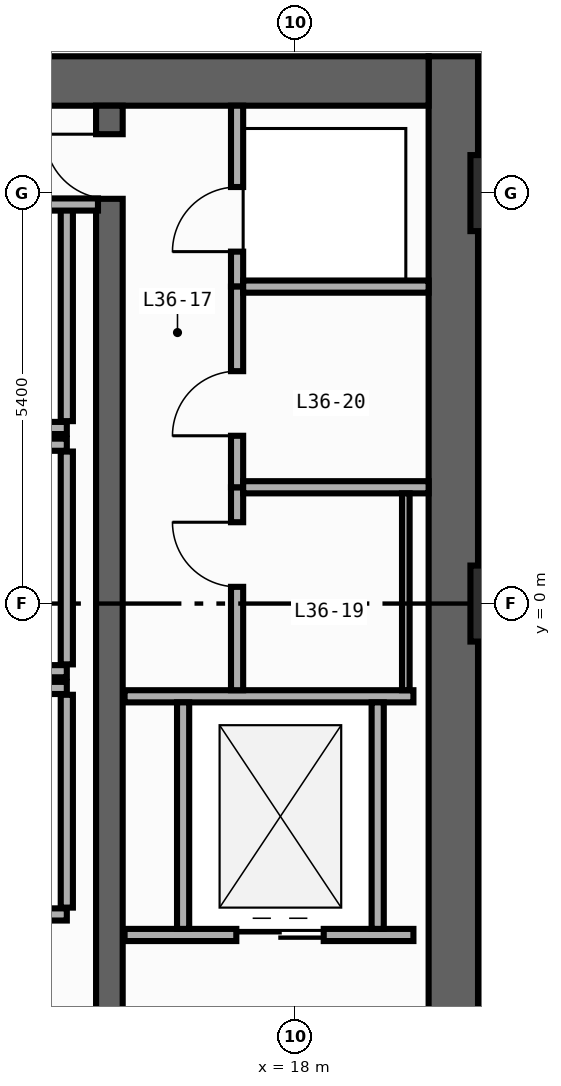
"""IFC4 building model, lengths in metres.
Left out: names, types, materials, properties, quantities, classifications, styles, units other than length and angle.
Written with IfcOpenShell. Run it as: python <this file> out.ifc"""

import sys

from ifc_helpers import new_model, si_unit, direction, frame, frame_2d, origin, origin_2d, place, context, subcontext, project, spatial, rectangle, extrude, element, fill, save


model = new_model("IFC4")
c1 = context("Model", 3, precision=1e-05, world=origin(), true_north=direction((0.0, 1.0)))
c2 = subcontext(c1, "Body", "Model", "MODEL_VIEW")
j1 = project(units=[si_unit("LENGTHUNIT", "METRE"), si_unit("PLANEANGLEUNIT", "RADIAN")], contexts=[c1])
p1 = place(None, origin())
s1 = spatial("IfcSite", under=j1, at=p1, CompositionType="ELEMENT")
p2 = place(p1, origin())
s2 = spatial("IfcBuilding", under=s1, at=p2, CompositionType="ELEMENT")
p3 = place(p2, frame((0.0, 0.0, 160.4)))
s3 = spatial("IfcBuildingStorey", under=s2, at=p3, CompositionType="ELEMENT", Elevation=160.4)
p4 = place(p3, frame((20.075, -19.8, 0.0), z_axis=(0.0, 0.0, 1.0), x_axis=(0.0, 1.0, 0.0)))
e1 = element("IfcWall", 1, at=p4, inside=s3, PredefinedType="SHEAR", context=c2, shape_type="SweptSolid", body=[
    extrude(rectangle(XDim=27.0, YDim=0.65, at=frame_2d((13.5, 0.0))), origin(), (0.0, 0.0, 1.0), 4.34),
])
p5 = place(p3, frame((12.65, 6.875, 0.0), z_axis=(0.0, 0.0, 1.0), x_axis=(1.0, 0.0, 0.0)))
e2 = element("IfcWall", 2, at=p5, inside=s3, PredefinedType="SHEAR", context=c2, shape_type="SweptSolid", body=[
    extrude(rectangle(XDim=7.1, YDim=0.65, at=frame_2d((3.55, 0.0))), origin(), (0.0, 0.0, 1.0), 4.34),
])
p6 = place(p3, frame((15.55, -19.15, 0.0), z_axis=(0.0, 0.0, 1.0), x_axis=(0.0, 1.0, 0.0)))
e3 = element("IfcWall", 3, at=p6, inside=s3, PredefinedType="SHEAR", context=c2, shape_type="SweptSolid", body=[
    extrude(rectangle(XDim=25.7, YDim=0.35, at=frame_2d((12.85, 0.0))), origin(), (0.0, 0.0, 1.0), 4.34),
])
p7 = place(p6, frame((12.075, 0.0, 0.0)))
e4 = element("IfcOpeningElement", 4, at=p7, cuts=e3, PredefinedType="OPENING", context=c2, shape_type="SweptSolid", body=[
    extrude(rectangle(XDim=1.15, YDim=2.2, at=frame_2d((0.575, 1.1))), frame((0.0, 0.185, 0.0), z_axis=(0.0, -1.0, 0.0), x_axis=(1.0, 0.0, 0.0)), (0.0, 0.0, 1.0), 0.37),
])
p8 = place(p6, frame((24.475, 0.0, 0.0)))
e5 = element("IfcOpeningElement", 5, at=p8, cuts=e3, PredefinedType="OPENING", context=c2, shape_type="SweptSolid", body=[
    extrude(rectangle(XDim=0.85, YDim=2.1, at=frame_2d((0.425, 1.05))), frame((0.0, 0.185, 0.0), z_axis=(0.0, -1.0, 0.0), x_axis=(1.0, 0.0, 0.0)), (0.0, 0.0, 1.0), 0.37),
])
for number, where, z_axis, x_axis in (
    (6, (20.8, 0.0, 0.0), (0.0, 0.0, 1.0), (1.0, 0.0, 0.0)),
    (7, (20.8, 5.4, 0.0), (0.0, 0.0, 1.0), (1.0, 0.0, 0.0)),
):
    element("IfcColumn", number, at=place(p3, frame(where, z_axis=z_axis, x_axis=x_axis)), inside=s3, PredefinedType="COLUMN", context=c2, shape_type="SweptSolid", body=[
        extrude(rectangle(XDim=1.0, YDim=1.0, at=origin_2d()), origin(), (0.0, 0.0, 1.0), 4.6),
    ])
p9 = place(p3, frame((12.65, 2.31, 0.0), z_axis=(0.0, 0.0, 1.0), x_axis=(1.0, 0.0, 0.0)))
e8 = element("IfcWall", 8, at=p9, inside=s3, PredefinedType="STANDARD", context=c2, shape_type="SweptSolid", body=[
    extrude(rectangle(XDim=2.34, YDim=0.16, at=frame_2d((1.17, 0.0))), origin(), (0.0, 0.0, 1.0), 4.34),
])
p10 = place(p3, frame((14.99, 2.4, 0.0), z_axis=(0.0, 0.0, 1.0), x_axis=(0.0, 1.0, 0.0)))
e9 = element("IfcWall", 9, at=p10, inside=s3, PredefinedType="STANDARD", context=c2, shape_type="SweptSolid", body=[
    extrude(rectangle(XDim=2.8, YDim=0.16, at=frame_2d((1.4, 0.0))), origin(), (0.0, 0.0, 1.0), 4.34),
])
for number, where, z_axis, x_axis in (
    (10, (12.65, -0.89, 0.0), (0.0, 0.0, 1.0), (1.0, 0.0, 0.0)),
    (11, (12.65, 2.09, 0.0), (0.0, 0.0, 1.0), (1.0, 0.0, 0.0)),
):
    element("IfcWall", number, at=place(p3, frame(where, z_axis=z_axis, x_axis=x_axis)), inside=s3, PredefinedType="STANDARD", context=c2, shape_type="SweptSolid", body=[
        extrude(rectangle(XDim=2.34, YDim=0.16, at=frame_2d((1.17, 0.0))), origin(), (0.0, 0.0, 1.0), 4.34),
    ])
p11 = place(p3, frame((14.99, -0.8, 0.0), z_axis=(0.0, 0.0, 1.0), x_axis=(0.0, 1.0, 0.0)))
e12 = element("IfcWall", 12, at=p11, inside=s3, PredefinedType="STANDARD", context=c2, shape_type="SweptSolid", body=[
    extrude(rectangle(XDim=2.8, YDim=0.16, at=frame_2d((1.4, 0.0))), origin(), (0.0, 0.0, 1.0), 4.34),
])
for number, where, z_axis, x_axis in (
    (13, (12.65, -4.09, 0.0), (0.0, 0.0, 1.0), (1.0, 0.0, 0.0)),
    (14, (12.65, -1.11, 0.0), (0.0, 0.0, 1.0), (1.0, 0.0, 0.0)),
):
    element("IfcWall", number, at=place(p3, frame(where, z_axis=z_axis, x_axis=x_axis)), inside=s3, PredefinedType="STANDARD", context=c2, shape_type="SweptSolid", body=[
        extrude(rectangle(XDim=2.34, YDim=0.16, at=frame_2d((1.17, 0.0))), origin(), (0.0, 0.0, 1.0), 4.34),
    ])
p12 = place(p3, frame((14.99, -4.0, 0.0), z_axis=(0.0, 0.0, 1.0), x_axis=(0.0, 1.0, 0.0)))
e15 = element("IfcWall", 15, at=p12, inside=s3, PredefinedType="STANDARD", context=c2, shape_type="SweptSolid", body=[
    extrude(rectangle(XDim=2.8, YDim=0.16, at=frame_2d((1.4, 0.0))), origin(), (0.0, 0.0, 1.0), 4.34),
])
p13 = place(p3, frame((15.75, -4.36, 0.0), z_axis=(0.0, 0.0, 1.0), x_axis=(1.0, 0.0, 0.0)))
e16 = element("IfcWall", 16, at=p13, inside=s3, PredefinedType="STANDARD", context=c2, shape_type="SweptSolid", body=[
    extrude(rectangle(XDim=3.8, YDim=0.16, at=frame_2d((1.9, 0.0))), origin(), (0.0, 0.0, 1.0), 4.34),
])
p14 = place(p13, frame((1.47, 0.0, 0.0)))
e17 = element("IfcOpeningElement", 17, at=p14, cuts=e16, PredefinedType="OPENING", context=c2, shape_type="SweptSolid", body=[
    extrude(rectangle(XDim=1.15, YDim=2.2, at=frame_2d((0.575, 1.1))), frame((0.0, 0.09, 0.0), z_axis=(0.0, -1.0, 0.0), x_axis=(1.0, 0.0, 0.0)), (0.0, 0.0, 1.0), 0.18),
])
p15 = place(p3, frame((15.75, -1.22, 0.0), z_axis=(0.0, 0.0, 1.0), x_axis=(1.0, 0.0, 0.0)))
e18 = element("IfcWall", 18, at=p15, inside=s3, PredefinedType="STANDARD", context=c2, shape_type="SweptSolid", body=[
    extrude(rectangle(XDim=3.8, YDim=0.16, at=frame_2d((1.9, 0.0))), origin(), (0.0, 0.0, 1.0), 4.34),
])
for number, where, z_axis, x_axis in (
    (19, (16.52, -4.28, 0.0), (0.0, 0.0, 1.0), (0.0, 1.0, 0.0)),
    (20, (19.08, -4.28, 0.0), (0.0, 0.0, 1.0), (0.0, 1.0, 0.0)),
):
    element("IfcWall", number, at=place(p3, frame(where, z_axis=z_axis, x_axis=x_axis)), inside=s3, PredefinedType="STANDARD", context=c2, shape_type="SweptSolid", body=[
        extrude(rectangle(XDim=2.98, YDim=0.16, at=frame_2d((1.49, 0.0))), origin(), (0.0, 0.0, 1.0), 4.34),
    ])
p16 = place(p3, frame((12.8, 5.25, 0.0), z_axis=(0.0, 0.0, 1.0), x_axis=(1.0, 0.0, 0.0)))
e21 = element("IfcWall", 21, at=p16, inside=s3, PredefinedType="STANDARD", context=c2, shape_type="SweptSolid", body=[
    extrude(rectangle(XDim=2.6, YDim=0.16, at=frame_2d((1.3, 0.0))), origin(), (0.0, 0.0, 1.0), 4.34),
])
p17 = place(p3, frame((17.23, 4.17, 0.0), z_axis=(0.0, 0.0, 1.0), x_axis=(0.0, 1.0, 0.0)))
e22 = element("IfcWall", 22, at=p17, inside=s3, PredefinedType="PARTITIONING", context=c2, shape_type="SweptSolid", body=[
    extrude(rectangle(XDim=2.38, YDim=0.16, at=frame_2d((1.19, 0.0))), origin(), (0.0, 0.0, 1.0), 4.34),
])
p18 = place(p17, frame((0.46, 0.0, 0.0)))
e23 = element("IfcOpeningElement", 23, at=p18, cuts=e22, PredefinedType="OPENING", context=c2, shape_type="SweptSolid", body=[
    extrude(rectangle(XDim=0.85, YDim=2.1, at=frame_2d((0.425, 1.05))), frame((0.0, 0.09, 0.0), z_axis=(0.0, -1.0, 0.0), x_axis=(1.0, 0.0, 0.0)), (0.0, 0.0, 1.0), 0.18),
])
p19 = place(p3, frame((17.23, -1.14, 0.0), z_axis=(0.0, 0.0, 1.0), x_axis=(0.0, 1.0, 0.0)))
e24 = element("IfcWall", 24, at=p19, inside=s3, PredefinedType="PARTITIONING", context=c2, shape_type="SweptSolid", body=[
    extrude(rectangle(XDim=2.67, YDim=0.16, at=frame_2d((1.335, 0.0))), origin(), (0.0, 0.0, 1.0), 4.34),
])
p20 = place(p19, frame((1.36, 0.0, 0.0)))
e25 = element("IfcOpeningElement", 25, at=p20, cuts=e24, PredefinedType="OPENING", context=c2, shape_type="SweptSolid", body=[
    extrude(rectangle(XDim=0.85, YDim=2.1, at=frame_2d((0.425, 1.05))), frame((0.0, 0.09, 0.0), z_axis=(0.0, -1.0, 0.0), x_axis=(1.0, 0.0, 0.0)), (0.0, 0.0, 1.0), 0.18),
])
p21 = place(p3, frame((17.23, 1.53, 0.0), z_axis=(0.0, 0.0, 1.0), x_axis=(0.0, 1.0, 0.0)))
e26 = element("IfcWall", 26, at=p21, inside=s3, PredefinedType="PARTITIONING", context=c2, shape_type="SweptSolid", body=[
    extrude(rectangle(XDim=2.64, YDim=0.16, at=frame_2d((1.32, 0.0))), origin(), (0.0, 0.0, 1.0), 4.34),
])
p22 = place(p21, frame((0.677, 0.0, 0.0)))
e27 = element("IfcOpeningElement", 27, at=p22, cuts=e26, PredefinedType="OPENING", context=c2, shape_type="SweptSolid", body=[
    extrude(rectangle(XDim=0.85, YDim=2.1, at=frame_2d((0.425, 1.05))), frame((0.0, 0.09, 0.0), z_axis=(0.0, -1.0, 0.0), x_axis=(1.0, 0.0, 0.0)), (0.0, 0.0, 1.0), 0.18),
])
for number, where, z_axis, x_axis in (
    (28, (17.31, 4.17, 0.0), (0.0, 0.0, 1.0), (1.0, 0.0, 0.0)),
    (29, (17.31, 1.53, 0.0), (0.0, 0.0, 1.0), (1.0, 0.0, 0.0)),
):
    element("IfcWall", number, at=place(p3, frame(where, z_axis=z_axis, x_axis=x_axis)), inside=s3, PredefinedType="PARTITIONING", context=c2, shape_type="SweptSolid", body=[
        extrude(rectangle(XDim=2.44, YDim=0.16, at=frame_2d((1.22, 0.0))), origin(), (0.0, 0.0, 1.0), 4.34),
    ])
p23 = place(p3, frame((19.45, 1.45, 0.0), z_axis=(0.0, 0.0, 1.0), x_axis=(0.0, -1.0, 0.0)))
e30 = element("IfcWall", 30, at=p23, inside=s3, PredefinedType="PARTITIONING", context=c2, shape_type="SweptSolid", body=[
    extrude(rectangle(XDim=2.59, YDim=0.1, at=frame_2d((1.295, 0.0))), origin(), (0.0, 0.0, 1.0), 4.34),
])
p24 = place(p8, origin())
e31 = element("IfcDoor", 31, at=p24, inside=s3, OperationType="SINGLE_SWING_RIGHT", PredefinedType="DOOR", context=c2, shape_type="SweptSolid", body=[
    extrude(rectangle(XDim=0.85, YDim=2.1, at=frame_2d((0.425, 1.05))), frame((0.0, 0.025, 0.0), z_axis=(0.0, -1.0, 0.0), x_axis=(1.0, 0.0, 0.0)), (0.0, 0.0, 1.0), 0.05),
])
fill(e5, e31)
p25 = place(p14, origin())
e32 = element("IfcDoor", 32, at=p25, inside=s3, OperationType="DOUBLE_DOOR_SLIDING", PredefinedType="DOOR", context=c2, shape_type="SweptSolid", body=[
    extrude(rectangle(XDim=1.15, YDim=2.2, at=frame_2d((0.575, 1.1))), frame((0.0, 0.025, 0.0), z_axis=(0.0, -1.0, 0.0), x_axis=(1.0, 0.0, 0.0)), (0.0, 0.0, 1.0), 0.05),
])
fill(e17, e32)
p26 = place(p18, origin())
e33 = element("IfcDoor", 33, at=p26, inside=s3, OperationType="SINGLE_SWING_LEFT", PredefinedType="DOOR", context=c2, shape_type="SweptSolid", body=[
    extrude(rectangle(XDim=0.85, YDim=2.1, at=frame_2d((0.425, 1.05))), frame((0.0, 0.025, 0.0), z_axis=(0.0, -1.0, 0.0), x_axis=(1.0, 0.0, 0.0)), (0.0, 0.0, 1.0), 0.05),
])
fill(e23, e33)
p27 = place(p20, origin())
e34 = element("IfcDoor", 34, at=p27, inside=s3, OperationType="SINGLE_SWING_RIGHT", PredefinedType="DOOR", context=c2, shape_type="SweptSolid", body=[
    extrude(rectangle(XDim=0.85, YDim=2.1, at=frame_2d((0.425, 1.05))), frame((0.0, 0.025, 0.0), z_axis=(0.0, -1.0, 0.0), x_axis=(1.0, 0.0, 0.0)), (0.0, 0.0, 1.0), 0.05),
])
fill(e25, e34)
p28 = place(p22, origin())
e35 = element("IfcDoor", 35, at=p28, inside=s3, OperationType="SINGLE_SWING_LEFT", PredefinedType="DOOR", context=c2, shape_type="SweptSolid", body=[
    extrude(rectangle(XDim=0.85, YDim=2.1, at=frame_2d((0.425, 1.05))), frame((0.0, 0.025, 0.0), z_axis=(0.0, -1.0, 0.0), x_axis=(1.0, 0.0, 0.0)), (0.0, 0.0, 1.0), 0.05),
])
fill(e27, e35)
save(model, sys.argv[1])
